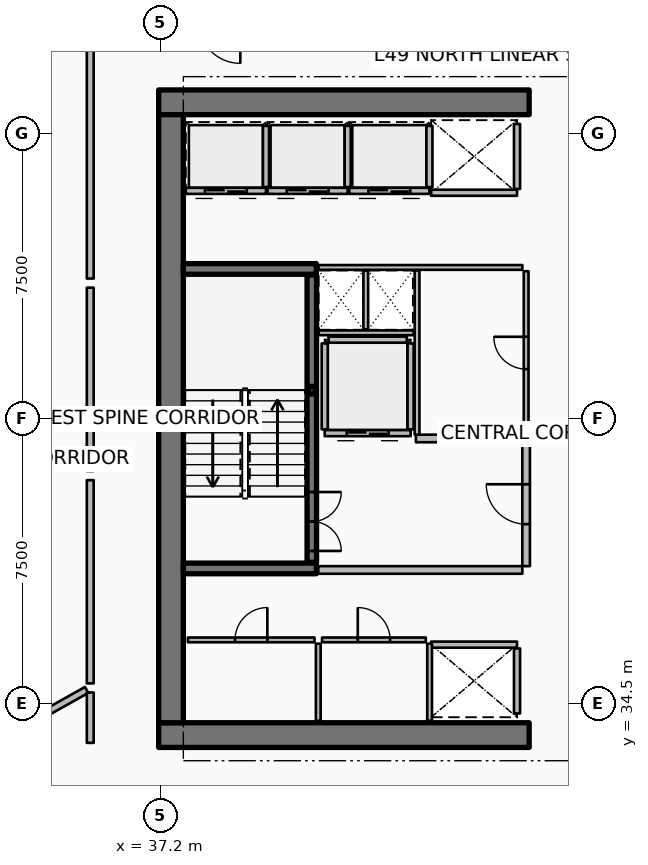
"""IFC4 building model, lengths in metres.
Left out: names, types, materials, properties, quantities, classifications, styles, units other than length and angle.
Written with IfcOpenShell. Run it as: python <this file> out.ifc"""

import sys

from ifc_helpers import new_model, si_unit, direction, frame, frame_2d, origin, origin_2d, place, context, subcontext, project, spatial, rectangle, hollow_rectangle, extrude, element, fill, save


model = new_model("IFC4")
c1 = context("Model", 3, precision=1e-05, world=origin(), true_north=direction((0.0, 1.0)))
c2 = subcontext(c1, "Body", "Model", "MODEL_VIEW")
j1 = project(units=[si_unit("LENGTHUNIT", "METRE"), si_unit("PLANEANGLEUNIT", "RADIAN")], contexts=[c1])
p1 = place(None, origin())
s1 = spatial("IfcSite", under=j1, at=p1, CompositionType="ELEMENT")
p2 = place(p1, origin())
s2 = spatial("IfcBuilding", under=s1, at=p2, CompositionType="ELEMENT")
p3 = place(p2, frame((0.0, 0.0, 195.3)))
s3 = spatial("IfcBuildingStorey", under=s2, at=p3, CompositionType="ELEMENT", Elevation=195.3)
for number, where, z_axis, x_axis in (
    (1, (37.15, 33.675, 0.0), (0.0, 0.0, 1.0), (1.0, 0.0, 0.0)),
    (2, (37.15, 50.325, 0.0), (0.0, 0.0, 1.0), (1.0, 0.0, 0.0)),
):
    element("IfcWall", number, at=place(p3, frame(where, z_axis=z_axis, x_axis=x_axis)), inside=s3, PredefinedType="SHEAR", context=c2, shape_type="SweptSolid", body=[
        extrude(rectangle(XDim=9.75, YDim=0.65, at=frame_2d((4.875, 0.0))), origin(), (0.0, 0.0, 1.0), 3.75),
    ])
p4 = place(p3, frame((37.475, 34.0, 0.0), z_axis=(0.0, 0.0, 1.0), x_axis=(0.0, 1.0, 0.0)))
e3 = element("IfcWall", 3, at=p4, inside=s3, PredefinedType="SHEAR", context=c2, shape_type="SweptSolid", body=[
    extrude(rectangle(XDim=16.0, YDim=0.65, at=frame_2d((8.0, 0.0))), origin(), (0.0, 0.0, 1.0), 3.75),
])
for number, where, z_axis, x_axis in (
    (4, (37.8, 38.06, 0.0), (0.0, 0.0, 1.0), (1.0, 0.0, 0.0)),
    (5, (37.8, 45.94, 0.0), (0.0, 0.0, 1.0), (1.0, 0.0, 0.0)),
):
    element("IfcWall", number, at=place(p3, frame(where, z_axis=z_axis, x_axis=x_axis)), inside=s3, PredefinedType="SHEAR", context=c2, shape_type="SweptSolid", body=[
        extrude(rectangle(XDim=3.5, YDim=0.28, at=frame_2d((1.75, 0.0))), origin(), (0.0, 0.0, 1.0), 3.75),
    ])
p5 = place(p3, frame((41.18, 42.75, 0.0), z_axis=(0.0, 0.0, 1.0), x_axis=(1.0, 0.0, 0.0)))
e6 = element("IfcColumn", 6, at=p5, inside=s3, PredefinedType="COLUMN", context=c2, shape_type="SweptSolid", body=[
    extrude(hollow_rectangle(XDim=0.2, YDim=0.2, WallThickness=0.01, InnerFilletRadius=0.01, OuterFilletRadius=0.02, at=origin_2d()), origin(), (0.0, 0.0, 1.0), 1.67),
])
p6 = place(p3, frame((41.18, 38.22, 0.0), z_axis=(0.0, 0.0, 1.0), x_axis=(0.0, 1.0, 0.0)))
e7 = element("IfcWall", 7, at=p6, inside=s3, PredefinedType="SOLIDWALL", context=c2, shape_type="SweptSolid", body=[
    extrude(rectangle(XDim=7.56, YDim=0.25, at=frame_2d((3.78, 0.0))), origin(), (0.0, 0.0, 1.0), 3.5),
])
p7 = place(p6, frame((0.3, 0.0, 0.0)))
e8 = element("IfcOpeningElement", 8, at=p7, cuts=e7, PredefinedType="OPENING", context=c2, shape_type="SweptSolid", body=[
    extrude(rectangle(XDim=1.55, YDim=2.15, at=frame_2d((0.775, 1.075))), frame((0.0, 0.135, 0.0), z_axis=(0.0, -1.0, 0.0), x_axis=(1.0, 0.0, 0.0)), (0.0, 0.0, 1.0), 0.27),
])
p8 = place(p3, frame((39.975, 47.995, 0.0), z_axis=(0.0, 0.0, 1.0), x_axis=(-1.0, 0.0, 0.0)))
e9 = element("IfcWall", 9, at=p8, inside=s3, PredefinedType="PARTITIONING", context=c2, shape_type="SweptSolid", body=[
    extrude(rectangle(XDim=2.11, YDim=0.16, at=frame_2d((1.055, 0.0))), origin(), (0.0, 0.0, 1.0), 3.5),
])
p9 = place(p8, frame((0.505, 0.0, 0.0)))
e10 = element("IfcOpeningElement", 10, at=p9, cuts=e9, PredefinedType="OPENING", context=c2, shape_type="SweptSolid", body=[
    extrude(rectangle(XDim=1.1, YDim=2.1, at=frame_2d((0.55, 1.05))), frame((0.0, 0.09, 0.0), z_axis=(0.0, -1.0, 0.0), x_axis=(1.0, 0.0, 0.0)), (0.0, 0.0, 1.0), 0.18),
])
p10 = place(p3, frame((39.975, 48.095, 0.0), z_axis=(0.0, 0.0, 1.0), x_axis=(0.0, 1.0, 0.0)))
e11 = element("IfcWall", 11, at=p10, inside=s3, PredefinedType="PARTITIONING", context=c2, shape_type="SweptSolid", body=[
    extrude(rectangle(XDim=1.61, YDim=0.16, at=frame_2d((0.805, 0.0))), origin(), (0.0, 0.0, 1.0), 3.5),
])
p11 = place(p3, frame((42.125, 47.995, 0.0), z_axis=(0.0, 0.0, 1.0), x_axis=(-1.0, 0.0, 0.0)))
e12 = element("IfcWall", 12, at=p11, inside=s3, PredefinedType="PARTITIONING", context=c2, shape_type="SweptSolid", body=[
    extrude(rectangle(XDim=2.11, YDim=0.16, at=frame_2d((1.055, 0.0))), origin(), (0.0, 0.0, 1.0), 3.5),
])
p12 = place(p11, frame((0.505, 0.0, 0.0)))
e13 = element("IfcOpeningElement", 13, at=p12, cuts=e12, PredefinedType="OPENING", context=c2, shape_type="SweptSolid", body=[
    extrude(rectangle(XDim=1.1, YDim=2.1, at=frame_2d((0.55, 1.05))), frame((0.0, 0.09, 0.0), z_axis=(0.0, -1.0, 0.0), x_axis=(1.0, 0.0, 0.0)), (0.0, 0.0, 1.0), 0.18),
])
p13 = place(p3, frame((42.125, 48.095, 0.0), z_axis=(0.0, 0.0, 1.0), x_axis=(0.0, 1.0, 0.0)))
e14 = element("IfcWall", 14, at=p13, inside=s3, PredefinedType="PARTITIONING", context=c2, shape_type="SweptSolid", body=[
    extrude(rectangle(XDim=1.61, YDim=0.16, at=frame_2d((0.805, 0.0))), origin(), (0.0, 0.0, 1.0), 3.5),
])
p14 = place(p3, frame((44.275, 47.995, 0.0), z_axis=(0.0, 0.0, 1.0), x_axis=(-1.0, 0.0, 0.0)))
e15 = element("IfcWall", 15, at=p14, inside=s3, PredefinedType="PARTITIONING", context=c2, shape_type="SweptSolid", body=[
    extrude(rectangle(XDim=2.11, YDim=0.16, at=frame_2d((1.055, 0.0))), origin(), (0.0, 0.0, 1.0), 3.5),
])
p15 = place(p14, frame((0.505, 0.0, 0.0)))
e16 = element("IfcOpeningElement", 16, at=p15, cuts=e15, PredefinedType="OPENING", context=c2, shape_type="SweptSolid", body=[
    extrude(rectangle(XDim=1.1, YDim=2.1, at=frame_2d((0.55, 1.05))), frame((0.0, 0.09, 0.0), z_axis=(0.0, -1.0, 0.0), x_axis=(1.0, 0.0, 0.0)), (0.0, 0.0, 1.0), 0.18),
])
p16 = place(p3, frame((44.275, 48.095, 0.0), z_axis=(0.0, 0.0, 1.0), x_axis=(0.0, 1.0, 0.0)))
e17 = element("IfcWall", 17, at=p16, inside=s3, PredefinedType="PARTITIONING", context=c2, shape_type="SweptSolid", body=[
    extrude(rectangle(XDim=1.61, YDim=0.16, at=frame_2d((0.805, 0.0))), origin(), (0.0, 0.0, 1.0), 3.5),
])
p17 = place(p3, frame((46.58, 47.945, 0.0), z_axis=(0.0, 0.0, 1.0), x_axis=(-1.0, 0.0, 0.0)))
e18 = element("IfcWall", 18, at=p17, inside=s3, PredefinedType="PARTITIONING", context=c2, shape_type="SweptSolid", body=[
    extrude(rectangle(XDim=2.26, YDim=0.16, at=frame_2d((1.13, 0.0))), origin(), (0.0, 0.0, 1.0), 3.5),
])
p18 = place(p3, frame((46.58, 48.045, 0.0), z_axis=(0.0, 0.0, 1.0), x_axis=(0.0, 1.0, 0.0)))
e19 = element("IfcWall", 19, at=p18, inside=s3, PredefinedType="PARTITIONING", context=c2, shape_type="SweptSolid", body=[
    extrude(rectangle(XDim=1.71, YDim=0.16, at=frame_2d((0.855, 0.0))), origin(), (0.0, 0.0, 1.0), 3.5),
])
p19 = place(p3, frame((44.32, 36.055, 0.0), z_axis=(0.0, 0.0, 1.0), x_axis=(1.0, 0.0, 0.0)))
e20 = element("IfcWall", 20, at=p19, inside=s3, PredefinedType="PARTITIONING", context=c2, shape_type="SweptSolid", body=[
    extrude(rectangle(XDim=2.26, YDim=0.16, at=frame_2d((1.13, 0.0))), origin(), (0.0, 0.0, 1.0), 3.5),
])
p20 = place(p3, frame((46.58, 34.245, 0.0), z_axis=(0.0, 0.0, 1.0), x_axis=(0.0, 1.0, 0.0)))
e21 = element("IfcWall", 21, at=p20, inside=s3, PredefinedType="PARTITIONING", context=c2, shape_type="SweptSolid", body=[
    extrude(rectangle(XDim=1.71, YDim=0.16, at=frame_2d((0.855, 0.0))), origin(), (0.0, 0.0, 1.0), 3.5),
])
p21 = place(p3, frame((43.78, 41.62, 0.0), z_axis=(0.0, 0.0, 1.0), x_axis=(-1.0, 0.0, 0.0)))
e22 = element("IfcWall", 22, at=p21, inside=s3, PredefinedType="PARTITIONING", context=c2, shape_type="SweptSolid", body=[
    extrude(rectangle(XDim=2.26, YDim=0.16, at=frame_2d((1.13, 0.0))), origin(), (0.0, 0.0, 1.0), 3.5),
])
p22 = place(p21, frame((0.58, 0.0, 0.0)))
e23 = element("IfcOpeningElement", 23, at=p22, cuts=e22, PredefinedType="OPENING", context=c2, shape_type="SweptSolid", body=[
    extrude(rectangle(XDim=1.1, YDim=2.1, at=frame_2d((0.55, 1.05))), frame((0.0, 0.09, 0.0), z_axis=(0.0, -1.0, 0.0), x_axis=(1.0, 0.0, 0.0)), (0.0, 0.0, 1.0), 0.18),
])
for number, where, z_axis, x_axis in (
    (24, (43.78, 41.72, 0.0), (0.0, 0.0, 1.0), (0.0, 1.0, 0.0)),
    (25, (41.52, 41.72, 0.0), (0.0, 0.0, 1.0), (0.0, 1.0, 0.0)),
):
    element("IfcWall", number, at=place(p3, frame(where, z_axis=z_axis, x_axis=x_axis)), inside=s3, PredefinedType="PARTITIONING", context=c2, shape_type="SweptSolid", body=[
        extrude(rectangle(XDim=2.26, YDim=0.16, at=frame_2d((1.13, 0.0))), origin(), (0.0, 0.0, 1.0), 3.5),
    ])
p23 = place(p3, frame((41.62, 44.08, 0.0), z_axis=(0.0, 0.0, 1.0), x_axis=(1.0, 0.0, 0.0)))
e26 = element("IfcWall", 26, at=p23, inside=s3, PredefinedType="PARTITIONING", context=c2, shape_type="SweptSolid", body=[
    extrude(rectangle(XDim=2.06, YDim=0.16, at=frame_2d((1.03, 0.0))), origin(), (0.0, 0.0, 1.0), 3.5),
])
for number, where, z_axis, x_axis in (
    (27, (44.28, 34.05, 0.0), (0.0, 0.0, 1.0), (0.0, 1.0, 0.0)),
    (28, (41.35, 34.05, 0.0), (0.0, 0.0, 1.0), (0.0, 1.0, 0.0)),
):
    element("IfcWall", number, at=place(p3, frame(where, z_axis=z_axis, x_axis=x_axis)), inside=s3, PredefinedType="PARTITIONING", context=c2, shape_type="SweptSolid", body=[
        extrude(rectangle(XDim=2.03, YDim=0.125, at=frame_2d((1.015, 0.0))), origin(), (0.0, 0.0, 1.0), 2.94),
    ])
p24 = place(p3, frame((37.92, 36.18, 0.0), z_axis=(0.0, 0.0, 1.0), x_axis=(1.0, 0.0, 0.0)))
e29 = element("IfcWall", 29, at=p24, inside=s3, PredefinedType="PARTITIONING", context=c2, shape_type="SweptSolid", body=[
    extrude(rectangle(XDim=3.33, YDim=0.125, at=frame_2d((1.665, 0.0))), origin(), (0.0, 0.0, 1.0), 2.94),
])
p25 = place(p24, frame((1.24, 0.0, 0.0)))
e30 = element("IfcOpeningElement", 30, at=p25, cuts=e29, PredefinedType="OPENING", context=c2, shape_type="SweptSolid", body=[
    extrude(rectangle(XDim=0.85, YDim=2.06, at=frame_2d((0.425, 1.03))), frame((0.0, 0.073, 0.0), z_axis=(0.0, -1.0, 0.0), x_axis=(1.0, 0.0, 0.0)), (0.0, 0.0, 1.0), 0.145),
])
p26 = place(p3, frame((41.45, 36.18, 0.0), z_axis=(0.0, 0.0, 1.0), x_axis=(1.0, 0.0, 0.0)))
e31 = element("IfcWall", 31, at=p26, inside=s3, PredefinedType="PARTITIONING", context=c2, shape_type="SweptSolid", body=[
    extrude(rectangle(XDim=2.73, YDim=0.125, at=frame_2d((1.365, 0.0))), origin(), (0.0, 0.0, 1.0), 2.94),
])
p27 = place(p26, frame((0.94, 0.0, 0.0)))
e32 = element("IfcOpeningElement", 32, at=p27, cuts=e31, PredefinedType="OPENING", context=c2, shape_type="SweptSolid", body=[
    extrude(rectangle(XDim=0.85, YDim=2.06, at=frame_2d((0.425, 1.03))), frame((0.0, 0.073, 0.0), z_axis=(0.0, -1.0, 0.0), x_axis=(1.0, 0.0, 0.0)), (0.0, 0.0, 1.0), 0.145),
])
p28 = place(p3, frame((41.35, 38.02, 0.0), z_axis=(0.0, 0.0, 1.0), x_axis=(1.0, 0.0, 0.0)))
e33 = element("IfcWall", 33, at=p28, inside=s3, PredefinedType="PARTITIONING", context=c2, shape_type="SweptSolid", body=[
    extrude(rectangle(XDim=5.37, YDim=0.2, at=frame_2d((2.685, 0.0))), origin(), (0.0, 0.0, 1.0), 3.5),
])
p29 = place(p3, frame((43.92, 41.48, 0.0), z_axis=(0.0, 0.0, 1.0), x_axis=(1.0, 0.0, 0.0)))
e34 = element("IfcWall", 34, at=p29, inside=s3, PredefinedType="PARTITIONING", context=c2, shape_type="SweptSolid", body=[
    extrude(rectangle(XDim=2.8, YDim=0.2, at=frame_2d((1.4, 0.0))), origin(), (0.0, 0.0, 1.0), 3.5),
])
p30 = place(p3, frame((46.82, 38.12, 0.0), z_axis=(0.0, 0.0, 1.0), x_axis=(0.0, 1.0, 0.0)))
e35 = element("IfcWall", 35, at=p30, inside=s3, PredefinedType="PARTITIONING", context=c2, shape_type="SweptSolid", body=[
    extrude(rectangle(XDim=3.26, YDim=0.2, at=frame_2d((1.63, 0.0))), origin(), (0.0, 0.0, 1.0), 3.5),
])
p31 = place(p30, frame((1.105, 0.0, 0.0)))
e36 = element("IfcOpeningElement", 36, at=p31, cuts=e35, PredefinedType="OPENING", context=c2, shape_type="SweptSolid", body=[
    extrude(rectangle(XDim=1.05, YDim=2.1, at=frame_2d((0.525, 1.05))), frame((0.0, 0.11, 0.0), z_axis=(0.0, -1.0, 0.0), x_axis=(1.0, 0.0, 0.0)), (0.0, 0.0, 1.0), 0.22),
])
p32 = place(p3, frame((41.36, 45.98, 0.0), z_axis=(0.0, 0.0, 1.0), x_axis=(1.0, 0.0, 0.0)))
e37 = element("IfcWall", 37, at=p32, inside=s3, PredefinedType="PARTITIONING", context=c2, shape_type="SweptSolid", body=[
    extrude(rectangle(XDim=5.36, YDim=0.125, at=frame_2d((2.68, 0.0))), origin(), (0.0, 0.0, 1.0), 2.94),
])
p33 = place(p3, frame((41.36, 44.26, 0.0), z_axis=(0.0, 0.0, 1.0), x_axis=(1.0, 0.0, 0.0)))
e38 = element("IfcWall", 38, at=p33, inside=s3, PredefinedType="PARTITIONING", context=c2, shape_type="SweptSolid", body=[
    extrude(rectangle(XDim=2.5, YDim=0.125, at=frame_2d((1.25, 0.0))), origin(), (0.0, 0.0, 1.0), 2.94),
])
p34 = place(p3, frame((42.6, 44.35, 0.0), z_axis=(0.0, 0.0, 1.0), x_axis=(0.0, 1.0, 0.0)))
e39 = element("IfcWall", 39, at=p34, inside=s3, PredefinedType="PARTITIONING", context=c2, shape_type="SweptSolid", body=[
    extrude(rectangle(XDim=1.55, YDim=0.125, at=frame_2d((0.775, 0.0))), origin(), (0.0, 0.0, 1.0), 2.94),
])
p35 = place(p3, frame((43.95, 41.58, 0.0), z_axis=(0.0, 0.0, 1.0), x_axis=(0.0, 1.0, 0.0)))
e40 = element("IfcWall", 40, at=p35, inside=s3, PredefinedType="PARTITIONING", context=c2, shape_type="SweptSolid", body=[
    extrude(rectangle(XDim=4.32, YDim=0.125, at=frame_2d((2.16, 0.0))), origin(), (0.0, 0.0, 1.0), 2.94),
])
p36 = place(p3, frame((46.82, 41.58, 0.0), z_axis=(0.0, 0.0, 1.0), x_axis=(0.0, 1.0, 0.0)))
e41 = element("IfcWall", 41, at=p36, inside=s3, PredefinedType="PARTITIONING", context=c2, shape_type="SweptSolid", body=[
    extrude(rectangle(XDim=4.3, YDim=0.125, at=frame_2d((2.15, 0.0))), origin(), (0.0, 0.0, 1.0), 2.94),
])
p37 = place(p36, frame((1.725, 0.0, 0.0)))
e42 = element("IfcOpeningElement", 42, at=p37, cuts=e41, PredefinedType="OPENING", context=c2, shape_type="SweptSolid", body=[
    extrude(rectangle(XDim=0.85, YDim=2.06, at=frame_2d((0.425, 1.03))), frame((0.0, 0.073, 0.0), z_axis=(0.0, -1.0, 0.0), x_axis=(1.0, 0.0, 0.0)), (0.0, 0.0, 1.0), 0.145),
])
p38 = place(p3, frame((35.254, 34.862, 0.0), z_axis=(0.0, 0.0, 1.0), x_axis=(-0.872489721771, -0.488632464541, 0.0)))
e43 = element("IfcWall", 43, at=p38, inside=s3, PredefinedType="PARTITIONING", context=c2, shape_type="SweptSolid", body=[
    extrude(rectangle(XDim=13.286, YDim=0.18, at=frame_2d((6.643, 0.0))), origin(), (0.0, 0.0, 1.0), 2.94),
])
p39 = place(p3, frame((35.35, 51.853, 0.0), z_axis=(0.0, 0.0, 1.0), x_axis=(0.0, -1.0, 0.0)))
e44 = element("IfcWall", 44, at=p39, inside=s3, PredefinedType="PARTITIONING", context=c2, shape_type="SweptSolid", body=[
    extrude(rectangle(XDim=6.165, YDim=0.18, at=frame_2d((3.083, 0.0))), origin(), (0.0, 0.0, 1.0), 2.94),
])
p40 = place(p3, frame((35.35, 45.448, 0.0), z_axis=(0.0, 0.0, 1.0), x_axis=(0.0, -1.0, 0.0)))
e45 = element("IfcWall", 45, at=p40, inside=s3, PredefinedType="PARTITIONING", context=c2, shape_type="SweptSolid", body=[
    extrude(rectangle(XDim=4.825, YDim=0.18, at=frame_2d((2.413, 0.0))), origin(), (0.0, 0.0, 1.0), 2.94),
])
p41 = place(p3, frame((35.35, 40.383, 0.0), z_axis=(0.0, 0.0, 1.0), x_axis=(0.0, -1.0, 0.0)))
e46 = element("IfcWall", 46, at=p41, inside=s3, PredefinedType="PARTITIONING", context=c2, shape_type="SweptSolid", body=[
    extrude(rectangle(XDim=5.347, YDim=0.18, at=frame_2d((2.674, 0.0))), origin(), (0.0, 0.0, 1.0), 2.94),
])
p42 = place(p3, frame((35.35, 34.796, 0.0), z_axis=(0.0, 0.0, 1.0), x_axis=(0.0, -1.0, 0.0)))
e47 = element("IfcWall", 47, at=p42, inside=s3, PredefinedType="PARTITIONING", context=c2, shape_type="SweptSolid", body=[
    extrude(rectangle(XDim=1.326, YDim=0.18, at=frame_2d((0.663, 0.0))), origin(), (0.0, 0.0, 1.0), 2.94),
])
p43 = place(p7, origin())
e48 = element("IfcDoor", 48, at=p43, inside=s3, OperationType="DOUBLE_DOOR_SINGLE_SWING", PredefinedType="DOOR", context=c2, shape_type="SweptSolid", body=[
    extrude(rectangle(XDim=1.55, YDim=2.15, at=frame_2d((0.775, 1.075))), frame((0.0, 0.025, 0.0), z_axis=(0.0, -1.0, 0.0), x_axis=(1.0, 0.0, 0.0)), (0.0, 0.0, 1.0), 0.05),
])
fill(e8, e48)
p44 = place(p9, origin())
e49 = element("IfcDoor", 49, at=p44, inside=s3, OperationType="DOUBLE_DOOR_SLIDING", PredefinedType="DOOR", context=c2, shape_type="SweptSolid", body=[
    extrude(rectangle(XDim=1.1, YDim=2.1, at=frame_2d((0.55, 1.05))), frame((0.0, 0.025, 0.0), z_axis=(0.0, -1.0, 0.0), x_axis=(1.0, 0.0, 0.0)), (0.0, 0.0, 1.0), 0.05),
])
fill(e10, e49)
p45 = place(p12, origin())
e50 = element("IfcDoor", 50, at=p45, inside=s3, OperationType="DOUBLE_DOOR_SLIDING", PredefinedType="DOOR", context=c2, shape_type="SweptSolid", body=[
    extrude(rectangle(XDim=1.1, YDim=2.1, at=frame_2d((0.55, 1.05))), frame((0.0, 0.025, 0.0), z_axis=(0.0, -1.0, 0.0), x_axis=(1.0, 0.0, 0.0)), (0.0, 0.0, 1.0), 0.05),
])
fill(e13, e50)
p46 = place(p15, origin())
e51 = element("IfcDoor", 51, at=p46, inside=s3, OperationType="DOUBLE_DOOR_SLIDING", PredefinedType="DOOR", context=c2, shape_type="SweptSolid", body=[
    extrude(rectangle(XDim=1.1, YDim=2.1, at=frame_2d((0.55, 1.05))), frame((0.0, 0.025, 0.0), z_axis=(0.0, -1.0, 0.0), x_axis=(1.0, 0.0, 0.0)), (0.0, 0.0, 1.0), 0.05),
])
fill(e16, e51)
p47 = place(p22, origin())
e52 = element("IfcDoor", 52, at=p47, inside=s3, OperationType="DOUBLE_DOOR_SLIDING", PredefinedType="DOOR", context=c2, shape_type="SweptSolid", body=[
    extrude(rectangle(XDim=1.1, YDim=2.1, at=frame_2d((0.55, 1.05))), frame((0.0, 0.025, 0.0), z_axis=(0.0, -1.0, 0.0), x_axis=(1.0, 0.0, 0.0)), (0.0, 0.0, 1.0), 0.05),
])
fill(e23, e52)
p48 = place(p25, origin())
e53 = element("IfcDoor", 53, at=p48, inside=s3, OperationType="SINGLE_SWING_RIGHT", PredefinedType="DOOR", context=c2, shape_type="SweptSolid", body=[
    extrude(rectangle(XDim=0.85, YDim=2.06, at=frame_2d((0.425, 1.03))), frame((0.0, 0.025, 0.0), z_axis=(0.0, -1.0, 0.0), x_axis=(1.0, 0.0, 0.0)), (0.0, 0.0, 1.0), 0.05),
])
fill(e30, e53)
p49 = place(p27, origin())
e54 = element("IfcDoor", 54, at=p49, inside=s3, OperationType="SINGLE_SWING_LEFT", PredefinedType="DOOR", context=c2, shape_type="SweptSolid", body=[
    extrude(rectangle(XDim=0.85, YDim=2.06, at=frame_2d((0.425, 1.03))), frame((0.0, 0.025, 0.0), z_axis=(0.0, -1.0, 0.0), x_axis=(1.0, 0.0, 0.0)), (0.0, 0.0, 1.0), 0.05),
])
fill(e32, e54)
p50 = place(p31, origin())
e55 = element("IfcDoor", 55, at=p50, inside=s3, OperationType="SINGLE_SWING_RIGHT", PredefinedType="DOOR", context=c2, shape_type="SweptSolid", body=[
    extrude(rectangle(XDim=1.05, YDim=2.1, at=frame_2d((0.525, 1.05))), frame((0.0, 0.025, 0.0), z_axis=(0.0, -1.0, 0.0), x_axis=(1.0, 0.0, 0.0)), (0.0, 0.0, 1.0), 0.05),
])
fill(e36, e55)
p51 = place(p37, origin())
e56 = element("IfcDoor", 56, at=p51, inside=s3, OperationType="SINGLE_SWING_RIGHT", PredefinedType="DOOR", context=c2, shape_type="SweptSolid", body=[
    extrude(rectangle(XDim=0.85, YDim=2.06, at=frame_2d((0.425, 1.03))), frame((0.0, 0.025, 0.0), z_axis=(0.0, -1.0, 0.0), x_axis=(1.0, 0.0, 0.0)), (0.0, 0.0, 1.0), 0.05),
])
fill(e42, e56)
save(model, sys.argv[1])
